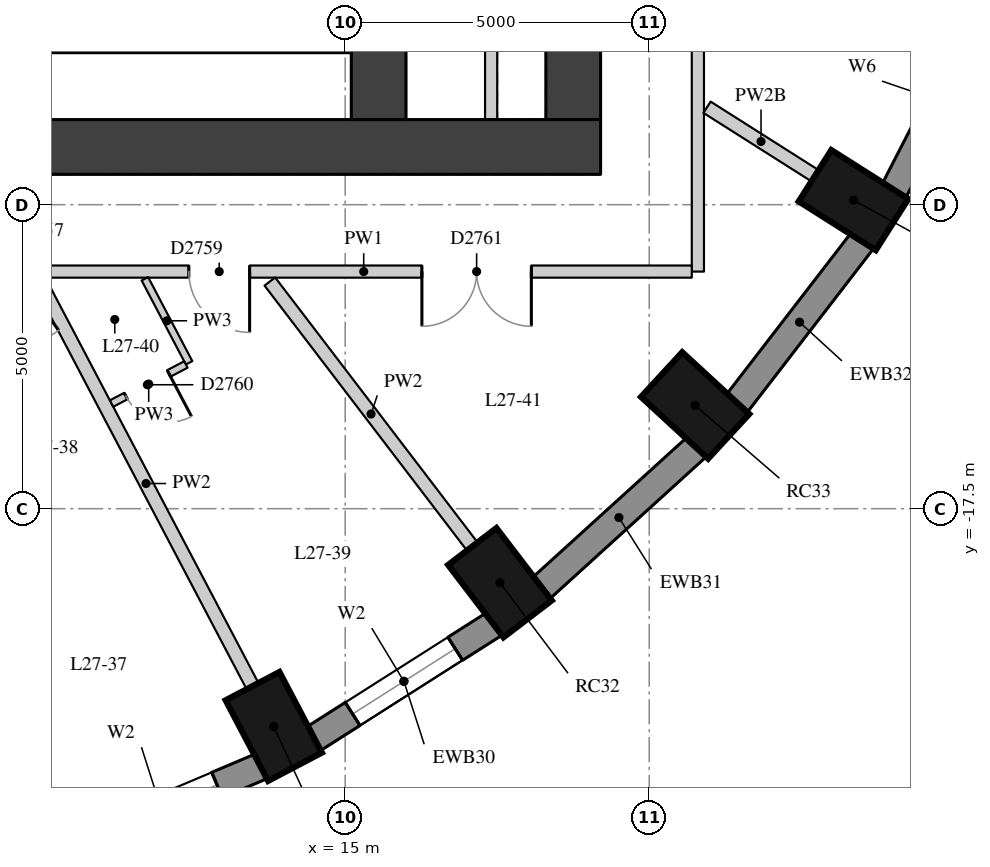
"""IFC4 building model, lengths in metres.
Left out: names, types, materials, properties, quantities, classifications, styles, units other than length and angle.
Written with IfcOpenShell. Run it as: python <this file> out.ifc"""

import sys

from ifc_helpers import new_model, si_unit, direction, frame, frame_2d, origin, origin_2d, place, context, subcontext, project, spatial, rectangle, extrude, element, fill, save


model = new_model("IFC4")
c1 = context("Model", 3, precision=1e-05, world=origin(), true_north=direction((0.0, 1.0)))
c2 = subcontext(c1, "Body", "Model", "MODEL_VIEW")
j1 = project(units=[si_unit("LENGTHUNIT", "METRE"), si_unit("PLANEANGLEUNIT", "RADIAN")], contexts=[c1])
p1 = place(None, origin())
s1 = spatial("IfcSite", under=j1, at=p1, CompositionType="ELEMENT")
p2 = place(p1, origin())
s2 = spatial("IfcBuilding", under=s1, at=p2, CompositionType="ELEMENT")
p3 = place(p2, frame((0.0, 0.0, 98.8)))
s3 = spatial("IfcBuildingStorey", under=s2, at=p3, CompositionType="ELEMENT", Elevation=98.8)
for number, where, z_axis, x_axis in (
    (1, (9.71, -22.824, 0.0), (0.0, 0.0, 1.0), (0.315, -0.949, 0.0)),
    (2, (13.825, -21.082, 0.0), (0.0, 0.0, 1.0), (0.465, -0.885, 0.0)),
    (3, (17.545, -18.717, 0.0), (0.0, 0.0, 1.0), (0.607, -0.795, 0.0)),
    (4, (20.755, -15.802, 0.0), (0.0, 0.0, 1.0), (0.735, -0.678, 0.0)),
    (5, (23.36, -12.425, 0.0), (0.0, 0.0, 1.0), (0.845, -0.536, 0.0)),
):
    element("IfcColumn", number, at=place(p3, frame(where, z_axis=z_axis, x_axis=x_axis)), inside=s3, PredefinedType="COLUMN", context=c2, shape_type="SweptSolid", body=[
        extrude(rectangle(XDim=1.5, YDim=1.0, at=origin_2d()), origin(), (0.0, 0.0, 1.0), 3.3),
    ])
p4 = place(p3, frame((10.318, -23.134, 0.0), z_axis=(0.0, 0.0, 1.0), x_axis=(0.920869643542, 0.389870619055, 0.0)))
e6 = element("IfcWall", 6, at=p4, inside=s3, PredefinedType="SOLIDWALL", context=c2, shape_type="SweptSolid", body=[
    extrude(rectangle(XDim=3.591, YDim=0.45, at=frame_2d((1.796, 0.0))), origin(), (0.0, 0.0, 1.0), 3.02),
])
p5 = place(p4, frame((0.796, 0.0, 0.4)))
e7 = element("IfcOpeningElement", 7, at=p5, cuts=e6, PredefinedType="OPENING", context=c2, shape_type="SweptSolid", body=[
    extrude(rectangle(XDim=2.0, YDim=1.75, at=frame_2d((1.0, 0.875))), frame((0.0, 0.235, 0.0), z_axis=(0.0, -1.0, 0.0), x_axis=(1.0, 0.0, 0.0)), (0.0, 0.0, 1.0), 0.47),
])
p6 = place(p3, frame((14.475, -21.287, 0.0), z_axis=(0.0, 0.0, 1.0), x_axis=(0.843911841423, 0.536481876587, 0.0)))
e8 = element("IfcWall", 8, at=p6, inside=s3, PredefinedType="SOLIDWALL", context=c2, shape_type="SweptSolid", body=[
    extrude(rectangle(XDim=3.532, YDim=0.45, at=frame_2d((1.766, 0.0))), origin(), (0.0, 0.0, 1.0), 3.02),
])
p7 = place(p6, frame((0.766, 0.0, 0.4)))
e9 = element("IfcOpeningElement", 9, at=p7, cuts=e8, PredefinedType="OPENING", context=c2, shape_type="SweptSolid", body=[
    extrude(rectangle(XDim=2.0, YDim=1.75, at=frame_2d((1.0, 0.875))), frame((0.0, 0.235, 0.0), z_axis=(0.0, -1.0, 0.0), x_axis=(1.0, 0.0, 0.0)), (0.0, 0.0, 1.0), 0.47),
])
p8 = place(p3, frame((18.219, -18.81, 0.0), z_axis=(0.0, 0.0, 1.0), x_axis=(0.740364106106, 0.672206062446, 0.0)))
e10 = element("IfcWall", 10, at=p8, inside=s3, PredefinedType="SOLIDWALL", context=c2, shape_type="SweptSolid", body=[
    extrude(rectangle(XDim=3.464, YDim=0.45, at=frame_2d((1.732, 0.0))), origin(), (0.0, 0.0, 1.0), 3.02),
])
p9 = place(p3, frame((21.435, -15.775, 0.0), z_axis=(0.0, 0.0, 1.0), x_axis=(0.610693945156, 0.791866721961, 0.0)))
e11 = element("IfcWall", 11, at=p9, inside=s3, PredefinedType="SOLIDWALL", context=c2, shape_type="SweptSolid", body=[
    extrude(rectangle(XDim=3.395, YDim=0.45, at=frame_2d((1.697, 0.0))), origin(), (0.0, 0.0, 1.0), 3.02),
])
p10 = place(p3, frame((24.023, -12.277, 0.0), z_axis=(0.0, 0.0, 1.0), x_axis=(0.456828186229, 0.889554949549, 0.0)))
e12 = element("IfcWall", 12, at=p10, inside=s3, PredefinedType="SOLIDWALL", context=c2, shape_type="SweptSolid", body=[
    extrude(rectangle(XDim=3.333, YDim=0.45, at=frame_2d((1.667, 0.0))), origin(), (0.0, 0.0, 1.0), 3.02),
])
p11 = place(p10, frame((1.366, 0.0, 0.4)))
e13 = element("IfcOpeningElement", 13, at=p11, cuts=e12, PredefinedType="OPENING", context=c2, shape_type="SweptSolid", body=[
    extrude(rectangle(XDim=0.6, YDim=1.75, at=frame_2d((0.3, 0.875))), frame((0.0, 0.235, 0.0), z_axis=(0.0, -1.0, 0.0), x_axis=(1.0, 0.0, 0.0)), (0.0, 0.0, 1.0), 0.47),
])
p12 = place(p3, frame((18.75, -11.1, 0.0), z_axis=(0.0, 0.0, 1.0), x_axis=(0.0, 1.0, 0.0)))
e14 = element("IfcWall", 14, at=p12, inside=s3, PredefinedType="SHEAR", context=c2, shape_type="SweptSolid", body=[
    extrude(rectangle(XDim=22.2, YDim=0.9, at=frame_2d((11.1, 0.0))), origin(), (0.0, 0.0, 1.0), 3.02),
])
p13 = place(p12, frame((15.675, 0.0, 0.0)))
e15 = element("IfcOpeningElement", 15, at=p13, cuts=e14, PredefinedType="OPENING", context=c2, shape_type="SweptSolid", body=[
    extrude(rectangle(XDim=1.5, YDim=2.1, at=frame_2d((0.75, 1.05))), frame((0.0, 0.46, 0.0), z_axis=(0.0, -1.0, 0.0), x_axis=(1.0, 0.0, 0.0)), (0.0, 0.0, 1.0), 0.92),
])
p14 = place(p12, frame((4.775, 0.0, 0.0)))
e16 = element("IfcOpeningElement", 16, at=p14, cuts=e14, PredefinedType="OPENING", context=c2, shape_type="SweptSolid", body=[
    extrude(rectangle(XDim=1.5, YDim=2.1, at=frame_2d((0.75, 1.05))), frame((0.0, 0.46, 0.0), z_axis=(0.0, -1.0, 0.0), x_axis=(1.0, 0.0, 0.0)), (0.0, 0.0, 1.0), 0.92),
])
p15 = place(p3, frame((4.0, -11.55, 0.0), z_axis=(0.0, 0.0, 1.0), x_axis=(1.0, 0.0, 0.0)))
e17 = element("IfcWall", 17, at=p15, inside=s3, PredefinedType="SHEAR", context=c2, shape_type="SweptSolid", body=[
    extrude(rectangle(XDim=15.2, YDim=0.9, at=frame_2d((7.6, 0.0))), origin(), (0.0, 0.0, 1.0), 3.02),
])
p16 = place(p3, frame((15.55, -11.1, 0.0), z_axis=(0.0, 0.0, 1.0), x_axis=(0.0, 1.0, 0.0)))
e18 = element("IfcWall", 18, at=p16, inside=s3, PredefinedType="SHEAR", context=c2, shape_type="SweptSolid", body=[
    extrude(rectangle(XDim=22.2, YDim=0.9, at=frame_2d((11.1, 0.0))), origin(), (0.0, 0.0, 1.0), 3.02),
])
p17 = place(p16, frame((15.6, 0.0, 0.0)))
e19 = element("IfcOpeningElement", 19, at=p17, cuts=e18, PredefinedType="OPENING", context=c2, shape_type="SweptSolid", body=[
    extrude(rectangle(XDim=1.0, YDim=2.1, at=frame_2d((0.5, 1.05))), frame((0.0, 0.46, 0.0), z_axis=(0.0, -1.0, 0.0), x_axis=(1.0, 0.0, 0.0)), (0.0, 0.0, 1.0), 0.92),
])
p18 = place(p16, frame((5.6, 0.0, 0.0)))
e20 = element("IfcOpeningElement", 20, at=p18, cuts=e18, PredefinedType="OPENING", context=c2, shape_type="SweptSolid", body=[
    extrude(rectangle(XDim=1.0, YDim=2.1, at=frame_2d((0.5, 1.05))), frame((0.0, 0.46, 0.0), z_axis=(0.0, -1.0, 0.0), x_axis=(1.0, 0.0, 0.0)), (0.0, 0.0, 1.0), 0.92),
])
p19 = place(p3, frame((4.9, -9.55, 0.0), z_axis=(0.0, 0.0, 1.0), x_axis=(1.0, 0.0, 0.0)))
e21 = element("IfcWall", 21, at=p19, inside=s3, PredefinedType="SHEAR", context=c2, shape_type="SweptSolid", body=[
    extrude(rectangle(XDim=10.2, YDim=0.9, at=frame_2d((5.1, 0.0))), origin(), (0.0, 0.0, 1.0), 3.02),
])
p20 = place(p3, frame((17.4, -11.1, 0.0), z_axis=(0.0, 0.0, 1.0), x_axis=(0.0, 1.0, 0.0)))
e22 = element("IfcWall", 22, at=p20, inside=s3, PredefinedType="PARTITIONING", context=c2, shape_type="SweptSolid", body=[
    extrude(rectangle(XDim=4.2, YDim=0.2, at=frame_2d((2.1, 0.0))), origin(), (0.0, 0.0, 1.0), 3.02),
])
p21 = place(p3, frame((20.8, 13.5, 0.0), z_axis=(0.0, 0.0, 1.0), x_axis=(0.0, -1.0, 0.0)))
e23 = element("IfcWall", 23, at=p21, inside=s3, PredefinedType="PARTITIONING", context=c2, shape_type="SweptSolid", body=[
    extrude(rectangle(XDim=27.1, YDim=0.2, at=frame_2d((13.55, 0.0))), origin(), (0.0, 0.0, 1.0), 3.02),
])
p22 = place(p21, frame((18.404, 0.0, 0.0)))
e24 = element("IfcOpeningElement", 24, at=p22, cuts=e23, PredefinedType="OPENING", context=c2, shape_type="SweptSolid", body=[
    extrude(rectangle(XDim=1.8, YDim=2.1, at=frame_2d((0.9, 1.05))), frame((0.0, 0.11, 0.0), z_axis=(0.0, -1.0, 0.0), x_axis=(1.0, 0.0, 0.0)), (0.0, 0.0, 1.0), 0.22),
])
p23 = place(p21, frame((7.996, 0.0, 0.0)))
e25 = element("IfcOpeningElement", 25, at=p23, cuts=e23, PredefinedType="OPENING", context=c2, shape_type="SweptSolid", body=[
    extrude(rectangle(XDim=1.8, YDim=2.1, at=frame_2d((0.9, 1.05))), frame((0.0, 0.11, 0.0), z_axis=(0.0, -1.0, 0.0), x_axis=(1.0, 0.0, 0.0)), (0.0, 0.0, 1.0), 0.22),
])
p24 = place(p21, frame((1.055, 0.0, 0.0)))
e26 = element("IfcOpeningElement", 26, at=p24, cuts=e23, PredefinedType="OPENING", context=c2, shape_type="SweptSolid", body=[
    extrude(rectangle(XDim=1.8, YDim=2.1, at=frame_2d((0.9, 1.05))), frame((0.0, 0.11, 0.0), z_axis=(0.0, -1.0, 0.0), x_axis=(1.0, 0.0, 0.0)), (0.0, 0.0, 1.0), 0.22),
])
p25 = place(p3, frame((20.7, -13.6, 0.0), z_axis=(0.0, 0.0, 1.0), x_axis=(-1.0, 0.0, 0.0)))
e27 = element("IfcWall", 27, at=p25, inside=s3, PredefinedType="PARTITIONING", context=c2, shape_type="SweptSolid", body=[
    extrude(rectangle(XDim=10.791, YDim=0.2, at=frame_2d((5.396, 0.0))), origin(), (0.0, 0.0, 1.0), 3.02),
])
p26 = place(p25, frame((7.272, 0.0, 0.0)))
e28 = element("IfcOpeningElement", 28, at=p26, cuts=e27, PredefinedType="OPENING", context=c2, shape_type="SweptSolid", body=[
    extrude(rectangle(XDim=1.0, YDim=2.1, at=frame_2d((0.5, 1.05))), frame((0.0, 0.11, 0.0), z_axis=(0.0, -1.0, 0.0), x_axis=(1.0, 0.0, 0.0)), (0.0, 0.0, 1.0), 0.22),
])
p27 = place(p25, frame((2.638, 0.0, 0.0)))
e29 = element("IfcOpeningElement", 29, at=p27, cuts=e27, PredefinedType="OPENING", context=c2, shape_type="SweptSolid", body=[
    extrude(rectangle(XDim=1.8, YDim=2.1, at=frame_2d((0.9, 1.05))), frame((0.0, 0.11, 0.0), z_axis=(0.0, -1.0, 0.0), x_axis=(1.0, 0.0, 0.0)), (0.0, 0.0, 1.0), 0.22),
])
p28 = place(p3, frame((13.476, -20.418, 0.0), z_axis=(0.0, 0.0, 1.0), x_axis=(-0.465332071749, 0.885136183308, 0.0)))
e30 = element("IfcWall", 30, at=p28, inside=s3, PredefinedType="PARTITIONING", context=c2, shape_type="SweptSolid", body=[
    extrude(rectangle(XDim=7.529, YDim=0.22, at=frame_2d((3.764, 0.0))), origin(), (0.0, 0.0, 1.0), 3.02),
])
p29 = place(p3, frame((17.089, -18.121, 0.0), z_axis=(0.0, 0.0, 1.0), x_axis=(-0.607064955951, 0.794652212767, 0.0)))
e31 = element("IfcWall", 31, at=p29, inside=s3, PredefinedType="PARTITIONING", context=c2, shape_type="SweptSolid", body=[
    extrude(rectangle(XDim=5.483, YDim=0.22, at=frame_2d((2.742, 0.0))), origin(), (0.0, 0.0, 1.0), 3.02),
])
p30 = place(p3, frame((22.727, -12.023, 0.0), z_axis=(0.0, 0.0, 1.0), x_axis=(-0.844497052188, 0.535560200954, 0.0)))
e32 = element("IfcWall", 32, at=p30, inside=s3, PredefinedType="PARTITIONING", context=c2, shape_type="SweptSolid", body=[
    extrude(rectangle(XDim=2.103, YDim=0.22, at=frame_2d((1.051, 0.0))), origin(), (0.0, 0.0, 1.0), 2.57),
])
p31 = place(p3, frame((11.705, -13.718, 0.0), z_axis=(0.0, 0.0, 1.0), x_axis=(0.465437210927, -0.885080901773, 0.0)))
e33 = element("IfcWall", 33, at=p31, inside=s3, PredefinedType="PARTITIONING", context=c2, shape_type="SweptSolid", body=[
    extrude(rectangle(XDim=1.562, YDim=0.12, at=frame_2d((0.781, 0.0))), origin(), (0.0, 0.0, 1.0), 3.02),
])
p32 = place(p3, frame((12.379, -15.128, 0.0), z_axis=(0.0, 0.0, 1.0), x_axis=(-0.885113826366, -0.465374595757, 0.0)))
e34 = element("IfcWall", 34, at=p32, inside=s3, PredefinedType="PARTITIONING", context=c2, shape_type="SweptSolid", body=[
    extrude(rectangle(XDim=1.38, YDim=0.12, at=frame_2d((0.69, 0.0))), origin(), (0.0, 0.0, 1.0), 3.02),
])
p33 = place(p32, frame((0.315, 0.0, 0.0)))
e35 = element("IfcOpeningElement", 35, at=p33, cuts=e34, PredefinedType="OPENING", context=c2, shape_type="SweptSolid", body=[
    extrude(rectangle(XDim=0.8, YDim=2.1, at=frame_2d((0.4, 1.05))), frame((0.0, 0.07, 0.0), z_axis=(0.0, -1.0, 0.0), x_axis=(1.0, 0.0, 0.0)), (0.0, 0.0, 1.0), 0.14),
])
p34 = place(p5, origin())
e36 = element("IfcWindow", 36, at=p34, inside=s3, PartitioningType="SINGLE_PANEL", PredefinedType="WINDOW", context=c2, shape_type="SweptSolid", body=[
    extrude(rectangle(XDim=2.0, YDim=1.75, at=frame_2d((1.0, 0.875))), frame((0.0, 0.035, 0.0), z_axis=(0.0, -1.0, 0.0), x_axis=(1.0, 0.0, 0.0)), (0.0, 0.0, 1.0), 0.06),
])
fill(e7, e36)
p35 = place(p7, origin())
e37 = element("IfcWindow", 37, at=p35, inside=s3, PartitioningType="SINGLE_PANEL", PredefinedType="WINDOW", context=c2, shape_type="SweptSolid", body=[
    extrude(rectangle(XDim=2.0, YDim=1.75, at=frame_2d((1.0, 0.875))), frame((0.0, 0.035, 0.0), z_axis=(0.0, -1.0, 0.0), x_axis=(1.0, 0.0, 0.0)), (0.0, 0.0, 1.0), 0.06),
])
fill(e9, e37)
p36 = place(p26, origin())
e38 = element("IfcDoor", 38, at=p36, inside=s3, OperationType="SINGLE_SWING_LEFT", PredefinedType="DOOR", context=c2, shape_type="SweptSolid", body=[
    extrude(rectangle(XDim=1.0, YDim=2.1, at=frame_2d((0.5, 1.05))), frame((0.0, 0.025, 0.0), z_axis=(0.0, -1.0, 0.0), x_axis=(1.0, 0.0, 0.0)), (0.0, 0.0, 1.0), 0.05),
])
fill(e28, e38)
p37 = place(p33, origin())
e39 = element("IfcDoor", 39, at=p37, inside=s3, OperationType="SINGLE_SWING_LEFT", PredefinedType="DOOR", context=c2, shape_type="SweptSolid", body=[
    extrude(rectangle(XDim=0.8, YDim=2.1, at=frame_2d((0.4, 1.05))), frame((0.0, 0.025, 0.0), z_axis=(0.0, -1.0, 0.0), x_axis=(1.0, 0.0, 0.0)), (0.0, 0.0, 1.0), 0.05),
])
fill(e35, e39)
p38 = place(p27, origin())
e40 = element("IfcDoor", 40, at=p38, inside=s3, OperationType="DOUBLE_DOOR_SINGLE_SWING", PredefinedType="DOOR", context=c2, shape_type="SweptSolid", body=[
    extrude(rectangle(XDim=1.8, YDim=2.1, at=frame_2d((0.9, 1.05))), frame((0.0, 0.025, 0.0), z_axis=(0.0, -1.0, 0.0), x_axis=(1.0, 0.0, 0.0)), (0.0, 0.0, 1.0), 0.05),
])
fill(e29, e40)
save(model, sys.argv[1])
